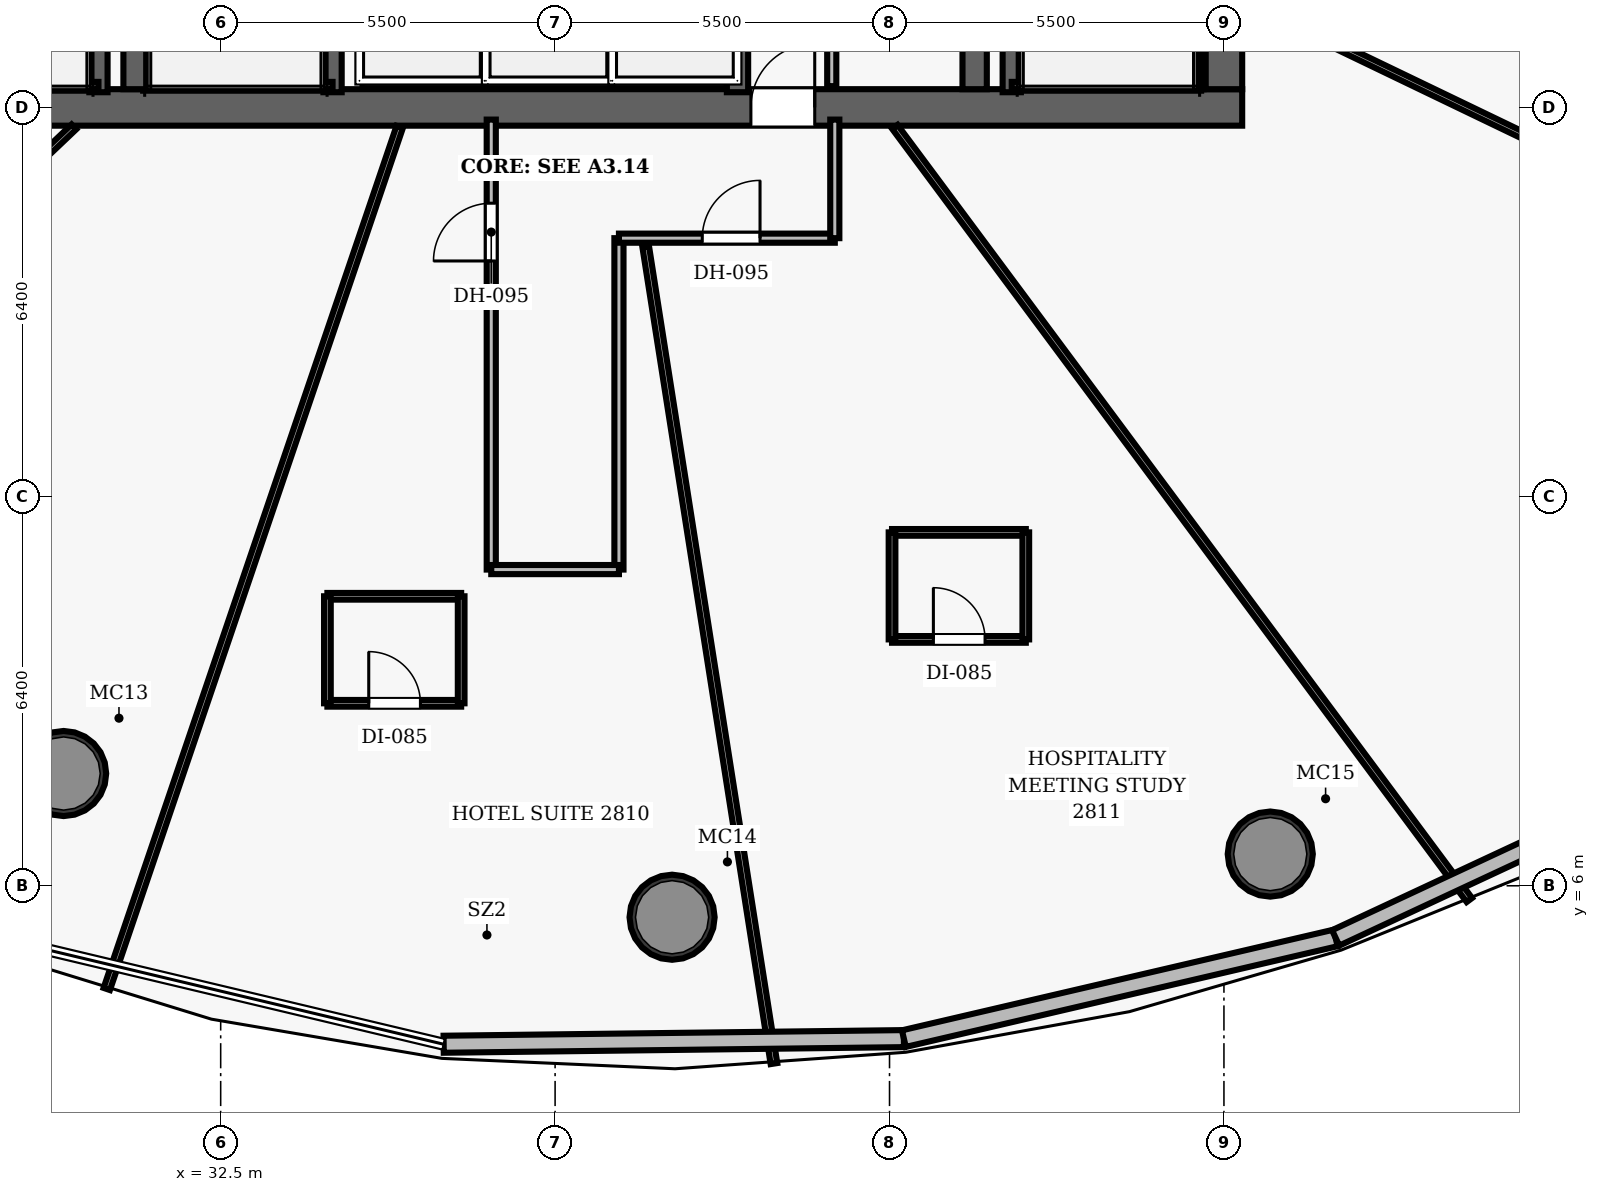
"""IFC4 building model, lengths in metres.
Left out: names, types, materials, properties, quantities, classifications, styles, units other than length and angle.
Written with IfcOpenShell. Run it as: python <this file> out.ifc"""

import sys

from ifc_helpers import new_model, si_unit, direction, frame, frame_2d, origin, origin_2d, place, context, subcontext, project, spatial, rectangle, hollow_circle, extrude, element, fill, save


model = new_model("IFC4")
c1 = context("Model", 3, precision=1e-05, world=origin(), true_north=direction((0.0, 1.0)))
c2 = subcontext(c1, "Body", "Model", "MODEL_VIEW")
j1 = project(units=[si_unit("LENGTHUNIT", "METRE"), si_unit("PLANEANGLEUNIT", "RADIAN")], contexts=[c1])
p1 = place(None, origin())
s1 = spatial("IfcSite", under=j1, at=p1, CompositionType="ELEMENT")
p2 = place(p1, origin())
s2 = spatial("IfcBuilding", under=s1, at=p2, CompositionType="ELEMENT")
p3 = place(p2, frame((0.0, 0.0, 116.8)))
s3 = spatial("IfcBuildingStorey", under=s2, at=p3, CompositionType="ELEMENT", Elevation=116.8)
p4 = place(p3, frame((26.7, 18.8, 0.0), z_axis=(0.0, 0.0, 1.0), x_axis=(1.0, 0.0, 0.0)))
e1 = element("IfcWall", 1, at=p4, inside=s3, PredefinedType="SHEAR", context=c2, shape_type="SweptSolid", body=[
    extrude(rectangle(XDim=22.6, YDim=0.6, at=frame_2d((11.3, 0.0))), origin(), (0.0, 0.0, 1.0), 3.5),
])
p5 = place(p4, frame((14.52, 0.0, 0.0)))
e2 = element("IfcOpeningElement", 2, at=p5, cuts=e1, PredefinedType="OPENING", context=c2, shape_type="SweptSolid", body=[
    extrude(rectangle(XDim=1.05, YDim=2.15, at=frame_2d((0.525, 1.075))), frame((0.0, 0.31, 0.0), z_axis=(0.0, -1.0, 0.0), x_axis=(1.0, 0.0, 0.0)), (0.0, 0.0, 1.0), 0.62),
])
p6 = place(p3, frame((49.0, 19.1, 0.0), z_axis=(0.0, 0.0, 1.0), x_axis=(0.0, 1.0, 0.0)))
e3 = element("IfcWall", 3, at=p6, inside=s3, PredefinedType="SHEAR", context=c2, shape_type="SweptSolid", body=[
    extrude(rectangle(XDim=13.8, YDim=0.6, at=frame_2d((6.9, 0.0))), origin(), (0.0, 0.0, 1.0), 3.5),
])
p7 = place(p6, frame((8.2, 0.0, 0.0)))
e4 = element("IfcOpeningElement", 4, at=p7, cuts=e3, PredefinedType="OPENING", context=c2, shape_type="SweptSolid", body=[
    extrude(rectangle(XDim=1.05, YDim=2.15, at=frame_2d((0.525, 1.075))), frame((0.0, 0.31, 0.0), z_axis=(0.0, -1.0, 0.0), x_axis=(1.0, 0.0, 0.0)), (0.0, 0.0, 1.0), 0.62),
])
for number, where, z_axis, x_axis in (
    (5, (31.1, 19.1, 0.0), (0.0, 0.0, 1.0), (0.0, 1.0, 0.0)),
    (6, (44.9, 19.1, 0.0), (0.0, 0.0, 1.0), (0.0, 1.0, 0.0)),
):
    element("IfcWall", number, at=place(p3, frame(where, z_axis=z_axis, x_axis=x_axis)), inside=s3, PredefinedType="SHEAR", context=c2, shape_type="SweptSolid", body=[
        extrude(rectangle(XDim=13.8, YDim=0.4, at=frame_2d((6.9, 0.0))), origin(), (0.0, 0.0, 1.0), 3.5),
    ])
for number, where, z_axis, x_axis in (
    (7, (29.917, 7.846, 0.0), (0.0, 0.0, 1.0), (1.0, 0.0, 0.0)),
    (8, (39.924, 5.483, 0.0), (0.0, 0.0, 1.0), (1.0, 0.0, 0.0)),
    (9, (49.762, 6.521, 0.0), (0.0, 0.0, 1.0), (1.0, 0.0, 0.0)),
):
    element("IfcColumn", number, at=place(p3, frame(where, z_axis=z_axis, x_axis=x_axis)), inside=s3, PredefinedType="COLUMN", context=c2, shape_type="SweptSolid", body=[
        extrude(hollow_circle(Radius=0.7, WallThickness=0.055, at=origin_2d()), origin(), (0.0, 0.0, 1.0), 3.5),
    ])
p8 = place(p3, frame((30.49, 19.05, 0.0), z_axis=(0.0, 0.0, 1.0), x_axis=(0.0, 1.0, 0.0)))
e10 = element("IfcWall", 10, at=p8, inside=s3, PredefinedType="SHEAR", context=c2, shape_type="SweptSolid", body=[
    extrude(rectangle(XDim=7.5, YDim=0.3, at=frame_2d((3.75, 0.0))), origin(), (0.0, 0.0, 1.0), 3.5),
])
p9 = place(p3, frame((27.395, 19.16, 0.0), z_axis=(0.0, 0.0, 1.0), x_axis=(1.0, 0.0, 0.0)))
e11 = element("IfcWall", 11, at=p9, inside=s3, PredefinedType="SHEAR", context=c2, shape_type="SweptSolid", body=[
    extrude(rectangle(XDim=3.095, YDim=0.12, at=frame_2d((1.547, 0.0))), origin(), (0.0, 0.0, 1.0), 3.5),
])
p10 = place(p3, frame((45.51, 19.05, 0.0), z_axis=(0.0, 0.0, 1.0), x_axis=(0.0, 1.0, 0.0)))
e12 = element("IfcWall", 12, at=p10, inside=s3, PredefinedType="SHEAR", context=c2, shape_type="SweptSolid", body=[
    extrude(rectangle(XDim=7.5, YDim=0.3, at=frame_2d((3.75, 0.0))), origin(), (0.0, 0.0, 1.0), 3.5),
])
p11 = place(p3, frame((48.605, 19.1, 0.0), z_axis=(0.0, 0.0, 1.0), x_axis=(0.0, 1.0, 0.0)))
e13 = element("IfcWall", 13, at=p11, inside=s3, PredefinedType="SHEAR", context=c2, shape_type="SweptSolid", body=[
    extrude(rectangle(XDim=7.45, YDim=0.12, at=frame_2d((3.725, 0.0))), origin(), (0.0, 0.0, 1.0), 3.5),
])
p12 = place(p3, frame((45.51, 19.16, 0.0), z_axis=(0.0, 0.0, 1.0), x_axis=(1.0, 0.0, 0.0)))
e14 = element("IfcWall", 14, at=p12, inside=s3, PredefinedType="SHEAR", context=c2, shape_type="SweptSolid", body=[
    extrude(rectangle(XDim=3.095, YDim=0.12, at=frame_2d((1.547, 0.0))), origin(), (0.0, 0.0, 1.0), 3.5),
])
p13 = place(p3, frame((34.34, 19.05, 0.0), z_axis=(0.0, 0.0, 1.0), x_axis=(0.0, 1.0, 0.0)))
e15 = element("IfcWall", 15, at=p13, inside=s3, PredefinedType="SHEAR", context=c2, shape_type="SweptSolid", body=[
    extrude(rectangle(XDim=7.5, YDim=0.3, at=frame_2d((3.75, 0.0))), origin(), (0.0, 0.0, 1.0), 3.5),
])
p14 = place(p3, frame((31.3, 19.16, 0.0), z_axis=(0.0, 0.0, 1.0), x_axis=(1.0, 0.0, 0.0)))
e16 = element("IfcWall", 16, at=p14, inside=s3, PredefinedType="SHEAR", context=c2, shape_type="SweptSolid", body=[
    extrude(rectangle(XDim=3.04, YDim=0.12, at=frame_2d((1.52, 0.0))), origin(), (0.0, 0.0, 1.0), 3.5),
])
p15 = place(p3, frame((41.0, 19.05, 0.0), z_axis=(0.0, 0.0, 1.0), x_axis=(0.0, 1.0, 0.0)))
e17 = element("IfcWall", 17, at=p15, inside=s3, PredefinedType="SHEAR", context=c2, shape_type="SweptSolid", body=[
    extrude(rectangle(XDim=2.08, YDim=0.35, at=frame_2d((1.04, 0.0))), origin(), (0.0, 0.0, 1.0), 2.675),
])
p16 = place(p3, frame((42.55, 19.15, 0.0), z_axis=(0.0, 0.0, 1.0), x_axis=(0.0, 1.0, 0.0)))
e18 = element("IfcWall", 18, at=p16, inside=s3, PredefinedType="PARTITIONING", context=c2, shape_type="SweptSolid", body=[
    extrude(rectangle(XDim=2.75, YDim=0.15, at=frame_2d((1.375, 0.0))), origin(), (0.0, 0.0, 1.0), 2.675),
])
p17 = place(p16, frame((0.7, 0.0, 0.0)))
e19 = element("IfcOpeningElement", 19, at=p17, cuts=e18, PredefinedType="OPENING", context=c2, shape_type="SweptSolid", body=[
    extrude(rectangle(XDim=0.85, YDim=2.1, at=frame_2d((0.425, 1.05))), frame((0.0, 0.085, 0.0), z_axis=(0.0, -1.0, 0.0), x_axis=(1.0, 0.0, 0.0)), (0.0, 0.0, 1.0), 0.17),
])
p18 = place(p3, frame((36.95, 11.2, 0.0), z_axis=(0.0, 0.0, 1.0), x_axis=(0.0, 1.0, 0.0)))
e20 = element("IfcWall", 20, at=p18, inside=s3, PredefinedType="PARTITIONING", context=c2, shape_type="SweptSolid", body=[
    extrude(rectangle(XDim=7.4, YDim=0.15, at=frame_2d((3.7, 0.0))), origin(), (0.0, 0.0, 1.0), 2.675),
])
p19 = place(p18, frame((5.075, 0.0, 0.0)))
e21 = element("IfcOpeningElement", 21, at=p19, cuts=e20, PredefinedType="OPENING", context=c2, shape_type="SweptSolid", body=[
    extrude(rectangle(XDim=0.95, YDim=2.15, at=frame_2d((0.475, 1.075))), frame((0.0, 0.085, 0.0), z_axis=(0.0, -1.0, 0.0), x_axis=(1.0, 0.0, 0.0)), (0.0, 0.0, 1.0), 0.17),
])
p20 = place(p3, frame((39.05, 11.2, 0.0), z_axis=(0.0, 0.0, 1.0), x_axis=(0.0, 1.0, 0.0)))
e22 = element("IfcWall", 22, at=p20, inside=s3, PredefinedType="PARTITIONING", context=c2, shape_type="SweptSolid", body=[
    extrude(rectangle(XDim=5.45, YDim=0.15, at=frame_2d((2.725, 0.0))), origin(), (0.0, 0.0, 1.0), 2.675),
])
p21 = place(p3, frame((39.05, 16.65, 0.0), z_axis=(0.0, 0.0, 1.0), x_axis=(1.0, 0.0, 0.0)))
e23 = element("IfcWall", 23, at=p21, inside=s3, PredefinedType="PARTITIONING", context=c2, shape_type="SweptSolid", body=[
    extrude(rectangle(XDim=3.55, YDim=0.15, at=frame_2d((1.775, 0.0))), origin(), (0.0, 0.0, 1.0), 2.675),
])
p22 = place(p21, frame((1.37, 0.0, 0.0)))
e24 = element("IfcOpeningElement", 24, at=p22, cuts=e23, PredefinedType="OPENING", context=c2, shape_type="SweptSolid", body=[
    extrude(rectangle(XDim=0.95, YDim=2.15, at=frame_2d((0.475, 1.075))), frame((0.0, 0.085, 0.0), z_axis=(0.0, -1.0, 0.0), x_axis=(1.0, 0.0, 0.0)), (0.0, 0.0, 1.0), 0.17),
])
p23 = place(p3, frame((42.6, 16.65, 0.0), z_axis=(0.0, 0.0, 1.0), x_axis=(0.0, 1.0, 0.0)))
e25 = element("IfcWall", 25, at=p23, inside=s3, PredefinedType="PARTITIONING", context=c2, shape_type="SweptSolid", body=[
    extrude(rectangle(XDim=1.95, YDim=0.15, at=frame_2d((0.975, 0.0))), origin(), (0.0, 0.0, 1.0), 2.675),
])
p24 = place(p3, frame((36.95, 11.2, 0.0), z_axis=(0.0, 0.0, 1.0), x_axis=(1.0, 0.0, 0.0)))
e26 = element("IfcWall", 26, at=p24, inside=s3, PredefinedType="PARTITIONING", context=c2, shape_type="SweptSolid", body=[
    extrude(rectangle(XDim=2.1, YDim=0.15, at=frame_2d((1.05, 0.0))), origin(), (0.0, 0.0, 1.0), 2.675),
])
p25 = place(p3, frame((30.086, 18.48, 0.0), z_axis=(0.0, 0.0, 1.0), x_axis=(-0.724907697958, -0.688846012866, 0.0)))
e27 = element("IfcWall", 27, at=p25, inside=s3, PredefinedType="PARTITIONING", context=c2, shape_type="SweptSolid", body=[
    extrude(rectangle(XDim=12.958, YDim=0.11, at=frame_2d((6.479, 0.0))), origin(), (0.0, 0.0, 1.0), 2.675),
])
p26 = place(p3, frame((35.445, 18.48, 0.0), z_axis=(0.0, 0.0, 1.0), x_axis=(-0.321754532436, -0.946823120153, 0.0)))
e28 = element("IfcWall", 28, at=p26, inside=s3, PredefinedType="PARTITIONING", context=c2, shape_type="SweptSolid", body=[
    extrude(rectangle(XDim=14.974, YDim=0.11, at=frame_2d((7.487, 0.0))), origin(), (0.0, 0.0, 1.0), 2.675),
])
p27 = place(p3, frame((39.49, 16.51, 0.0), z_axis=(0.0, 0.0, 1.0), x_axis=(0.15511343863, -0.987896665222, 0.0)))
e29 = element("IfcWall", 29, at=p27, inside=s3, PredefinedType="PARTITIONING", context=c2, shape_type="SweptSolid", body=[
    extrude(rectangle(XDim=13.599, YDim=0.11, at=frame_2d((6.799, 0.0))), origin(), (0.0, 0.0, 1.0), 2.675),
])
p28 = place(p3, frame((43.588, 18.48, 0.0), z_axis=(0.0, 0.0, 1.0), x_axis=(0.596440621001, -0.802657203057, 0.0)))
e30 = element("IfcWall", 30, at=p28, inside=s3, PredefinedType="PARTITIONING", context=c2, shape_type="SweptSolid", body=[
    extrude(rectangle(XDim=15.841, YDim=0.11, at=frame_2d((7.92, 0.0))), origin(), (0.0, 0.0, 1.0), 2.675),
])
p29 = place(p3, frame((49.32, 20.554, 0.0), z_axis=(0.0, 0.0, 1.0), x_axis=(0.901134026531, -0.433540616583, 0.0)))
e31 = element("IfcWall", 31, at=p29, inside=s3, PredefinedType="PARTITIONING", context=c2, shape_type="SweptSolid", body=[
    extrude(rectangle(XDim=15.536, YDim=0.11, at=frame_2d((7.768, 0.0))), origin(), (0.0, 0.0, 1.0), 2.675),
])
p30 = place(p3, frame((34.255, 9.001, 0.0), z_axis=(0.0, 0.0, 1.0), x_axis=(1.0, 0.0, 0.0)))
e32 = element("IfcWall", 32, at=p30, inside=s3, PredefinedType="PARTITIONING", context=c2, shape_type="SweptSolid", body=[
    extrude(rectangle(XDim=2.2, YDim=0.11, at=frame_2d((1.1, 0.0))), origin(), (0.0, 0.0, 1.0), 2.675),
])
p31 = place(p30, frame((0.68, 0.0, 0.0)))
e33 = element("IfcOpeningElement", 33, at=p31, cuts=e32, PredefinedType="OPENING", context=c2, shape_type="SweptSolid", body=[
    extrude(rectangle(XDim=0.85, YDim=2.1, at=frame_2d((0.425, 1.05))), frame((0.0, 0.065, 0.0), z_axis=(0.0, -1.0, 0.0), x_axis=(1.0, 0.0, 0.0)), (0.0, 0.0, 1.0), 0.13),
])
p32 = place(p3, frame((34.255, 10.761, 0.0), z_axis=(0.0, 0.0, 1.0), x_axis=(1.0, 0.0, 0.0)))
e34 = element("IfcWall", 34, at=p32, inside=s3, PredefinedType="PARTITIONING", context=c2, shape_type="SweptSolid", body=[
    extrude(rectangle(XDim=2.2, YDim=0.11, at=frame_2d((1.1, 0.0))), origin(), (0.0, 0.0, 1.0), 2.675),
])
for number, where, z_axis, x_axis in (
    (35, (34.255, 9.001, 0.0), (0.0, 0.0, 1.0), (0.0, 1.0, 0.0)),
    (36, (36.455, 9.001, 0.0), (0.0, 0.0, 1.0), (0.0, 1.0, 0.0)),
):
    element("IfcWall", number, at=place(p3, frame(where, z_axis=z_axis, x_axis=x_axis)), inside=s3, PredefinedType="PARTITIONING", context=c2, shape_type="SweptSolid", body=[
        extrude(rectangle(XDim=1.76, YDim=0.11, at=frame_2d((0.88, 0.0))), origin(), (0.0, 0.0, 1.0), 2.675),
    ])
p33 = place(p3, frame((43.541, 10.052, 0.0), z_axis=(0.0, 0.0, 1.0), x_axis=(1.0, 0.0, 0.0)))
e37 = element("IfcWall", 37, at=p33, inside=s3, PredefinedType="PARTITIONING", context=c2, shape_type="SweptSolid", body=[
    extrude(rectangle(XDim=2.2, YDim=0.11, at=frame_2d((1.1, 0.0))), origin(), (0.0, 0.0, 1.0), 2.675),
])
p34 = place(p33, frame((0.68, 0.0, 0.0)))
e38 = element("IfcOpeningElement", 38, at=p34, cuts=e37, PredefinedType="OPENING", context=c2, shape_type="SweptSolid", body=[
    extrude(rectangle(XDim=0.85, YDim=2.1, at=frame_2d((0.425, 1.05))), frame((0.0, 0.065, 0.0), z_axis=(0.0, -1.0, 0.0), x_axis=(1.0, 0.0, 0.0)), (0.0, 0.0, 1.0), 0.13),
])
p35 = place(p3, frame((43.541, 11.812, 0.0), z_axis=(0.0, 0.0, 1.0), x_axis=(1.0, 0.0, 0.0)))
e39 = element("IfcWall", 39, at=p35, inside=s3, PredefinedType="PARTITIONING", context=c2, shape_type="SweptSolid", body=[
    extrude(rectangle(XDim=2.2, YDim=0.11, at=frame_2d((1.1, 0.0))), origin(), (0.0, 0.0, 1.0), 2.675),
])
for number, where, z_axis, x_axis in (
    (40, (43.541, 10.052, 0.0), (0.0, 0.0, 1.0), (0.0, 1.0, 0.0)),
    (41, (45.741, 10.052, 0.0), (0.0, 0.0, 1.0), (0.0, 1.0, 0.0)),
):
    element("IfcWall", number, at=place(p3, frame(where, z_axis=z_axis, x_axis=x_axis)), inside=s3, PredefinedType="PARTITIONING", context=c2, shape_type="SweptSolid", body=[
        extrude(rectangle(XDim=1.76, YDim=0.11, at=frame_2d((0.88, 0.0))), origin(), (0.0, 0.0, 1.0), 2.675),
    ])
p36 = place(p3, frame((43.736, 3.486, 0.0), z_axis=(0.0, 0.0, 1.0), x_axis=(-0.999925676567, -0.012191855549, 0.0)))
e42 = element("IfcWall", 42, at=p36, inside=s3, PredefinedType="SOLIDWALL", context=c2, shape_type="SweptSolid", body=[
    extrude(rectangle(XDim=7.569, YDim=0.28, at=frame_2d((3.785, 0.0))), origin(), (0.0, 0.0, 1.0), 3.26),
])
p37 = place(p3, frame((50.837, 5.142, 0.0), z_axis=(0.0, 0.0, 1.0), x_axis=(-0.973870590346, -0.227103661922, 0.0)))
e43 = element("IfcWall", 43, at=p37, inside=s3, PredefinedType="SOLIDWALL", context=c2, shape_type="SweptSolid", body=[
    extrude(rectangle(XDim=7.292, YDim=0.28, at=frame_2d((3.646, 0.0))), origin(), (0.0, 0.0, 1.0), 3.26),
])
p38 = place(p3, frame((56.877, 7.96, 0.0), z_axis=(0.0, 0.0, 1.0), x_axis=(-0.906209341309, -0.422829315119, 0.0)))
e44 = element("IfcWall", 44, at=p38, inside=s3, PredefinedType="SOLIDWALL", context=c2, shape_type="SweptSolid", body=[
    extrude(rectangle(XDim=6.665, YDim=0.28, at=frame_2d((3.333, 0.0))), origin(), (0.0, 0.0, 1.0), 3.26),
])
p39 = place(p5, origin())
e45 = element("IfcDoor", 45, at=p39, inside=s3, OperationType="SINGLE_SWING_RIGHT", PredefinedType="DOOR", context=c2, shape_type="SweptSolid", body=[
    extrude(rectangle(XDim=1.05, YDim=2.15, at=frame_2d((0.525, 1.075))), frame((0.0, 0.025, 0.0), z_axis=(0.0, -1.0, 0.0), x_axis=(1.0, 0.0, 0.0)), (0.0, 0.0, 1.0), 0.05),
])
fill(e2, e45)
p40 = place(p19, origin())
e46 = element("IfcDoor", 46, at=p40, inside=s3, OperationType="SINGLE_SWING_LEFT", PredefinedType="DOOR", context=c2, shape_type="SweptSolid", body=[
    extrude(rectangle(XDim=0.95, YDim=2.15, at=frame_2d((0.475, 1.075))), frame((0.0, 0.025, 0.0), z_axis=(0.0, -1.0, 0.0), x_axis=(1.0, 0.0, 0.0)), (0.0, 0.0, 1.0), 0.05),
])
fill(e21, e46)
p41 = place(p31, origin())
e47 = element("IfcDoor", 47, at=p41, inside=s3, OperationType="SINGLE_SWING_LEFT", PredefinedType="DOOR", context=c2, shape_type="SweptSolid", body=[
    extrude(rectangle(XDim=0.85, YDim=2.1, at=frame_2d((0.425, 1.05))), frame((0.0, 0.025, 0.0), z_axis=(0.0, -1.0, 0.0), x_axis=(1.0, 0.0, 0.0)), (0.0, 0.0, 1.0), 0.05),
])
fill(e33, e47)
p42 = place(p22, origin())
e48 = element("IfcDoor", 48, at=p42, inside=s3, OperationType="SINGLE_SWING_RIGHT", PredefinedType="DOOR", context=c2, shape_type="SweptSolid", body=[
    extrude(rectangle(XDim=0.95, YDim=2.15, at=frame_2d((0.475, 1.075))), frame((0.0, 0.025, 0.0), z_axis=(0.0, -1.0, 0.0), x_axis=(1.0, 0.0, 0.0)), (0.0, 0.0, 1.0), 0.05),
])
fill(e24, e48)
p43 = place(p34, origin())
e49 = element("IfcDoor", 49, at=p43, inside=s3, OperationType="SINGLE_SWING_LEFT", PredefinedType="DOOR", context=c2, shape_type="SweptSolid", body=[
    extrude(rectangle(XDim=0.85, YDim=2.1, at=frame_2d((0.425, 1.05))), frame((0.0, 0.025, 0.0), z_axis=(0.0, -1.0, 0.0), x_axis=(1.0, 0.0, 0.0)), (0.0, 0.0, 1.0), 0.05),
])
fill(e38, e49)
save(model, sys.argv[1])
